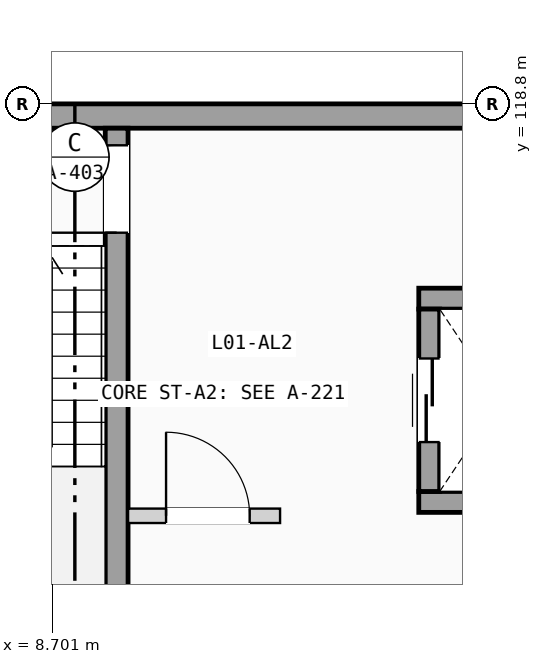
"""IFC4 building model, lengths in metres.
Left out: names, types, materials, properties, quantities, classifications, styles, units other than length and angle.
Written with IfcOpenShell. Run it as: python <this file> out.ifc"""

import sys

from ifc_helpers import new_model, si_unit, direction, frame, frame_2d, origin, place, context, subcontext, project, spatial, rectangle, extrude, element, fill, save


model = new_model("IFC4")
c1 = context("Model", 3, precision=1e-05, world=origin(), true_north=direction((0.0, 1.0)))
c2 = subcontext(c1, "Body", "Model", "MODEL_VIEW")
j1 = project(units=[si_unit("LENGTHUNIT", "METRE"), si_unit("PLANEANGLEUNIT", "RADIAN")], contexts=[c1])
p1 = place(None, origin())
s1 = spatial("IfcSite", under=j1, at=p1, CompositionType="ELEMENT")
p2 = place(p1, origin())
s2 = spatial("IfcBuilding", under=s1, at=p2, CompositionType="ELEMENT")
p3 = place(p2, frame((0.0, 0.0, 4.9)))
s3 = spatial("IfcBuildingStorey", under=s2, at=p3, CompositionType="ELEMENT", Elevation=4.9)
p4 = place(p3, frame((0.0, 118.64, 0.0), z_axis=(0.0, 0.0, 1.0), x_axis=(1.0, 0.0, 0.0)))
e1 = element("IfcWall", 1, at=p4, inside=s3, PredefinedType="SOLIDWALL", context=c2, shape_type="SweptSolid", body=[
    extrude(rectangle(XDim=21.6, YDim=0.32, at=frame_2d((10.8, 0.0))), origin(), (0.0, 0.0, 1.0), 3.415),
])
p5 = place(p3, frame((9.55, 111.48, 0.0), z_axis=(0.0, 0.0, 1.0), x_axis=(0.0, 1.0, 0.0)))
e2 = element("IfcWall", 2, at=p5, inside=s3, PredefinedType="SHEAR", context=c2, shape_type="SweptSolid", body=[
    extrude(rectangle(XDim=7.0, YDim=0.3, at=frame_2d((3.5, 0.0))), origin(), (0.0, 0.0, 1.0), 3.415),
])
p6 = place(p5, frame((5.625, 0.0, 0.0)))
e3 = element("IfcOpeningElement", 3, at=p6, cuts=e2, PredefinedType="OPENING", context=c2, shape_type="SweptSolid", body=[
    extrude(rectangle(XDim=1.15, YDim=2.12, at=frame_2d((0.575, 1.06))), frame((0.0, 0.16, 0.0), z_axis=(0.0, -1.0, 0.0), x_axis=(1.0, 0.0, 0.0)), (0.0, 0.0, 1.0), 0.32),
])
for number, where, z_axis, x_axis in (
    (4, (13.525, 113.562, 0.0), (0.0, 0.0, 1.0), (1.0, 0.0, 0.0)),
    (5, (13.525, 116.238, 0.0), (0.0, 0.0, 1.0), (1.0, 0.0, 0.0)),
):
    element("IfcWall", number, at=place(p3, frame(where, z_axis=z_axis, x_axis=x_axis)), inside=s3, PredefinedType="SHEAR", context=c2, shape_type="SweptSolid", body=[
        extrude(rectangle(XDim=2.15, YDim=0.275, at=frame_2d((1.075, 0.0))), origin(), (0.0, 0.0, 1.0), 3.415),
    ])
p7 = place(p3, frame((13.663, 113.7, 0.0), z_axis=(0.0, 0.0, 1.0), x_axis=(0.0, 1.0, 0.0)))
e6 = element("IfcWall", 6, at=p7, inside=s3, PredefinedType="SHEAR", context=c2, shape_type="SweptSolid", body=[
    extrude(rectangle(XDim=2.4, YDim=0.275, at=frame_2d((1.2, 0.0))), origin(), (0.0, 0.0, 1.0), 3.415),
])
p8 = place(p7, frame((0.65, 0.0, 0.0)))
e7 = element("IfcOpeningElement", 7, at=p8, cuts=e6, PredefinedType="OPENING", context=c2, shape_type="SweptSolid", body=[
    extrude(rectangle(XDim=1.1, YDim=2.15, at=frame_2d((0.55, 1.075))), frame((0.0, 0.147, 0.0), z_axis=(0.0, -1.0, 0.0), x_axis=(1.0, 0.0, 0.0)), (0.0, 0.0, 1.0), 0.295),
])
p9 = place(p3, frame((9.7, 113.38, 0.0), z_axis=(0.0, 0.0, 1.0), x_axis=(1.0, 0.0, 0.0)))
e8 = element("IfcWall", 8, at=p9, inside=s3, PredefinedType="PARTITIONING", context=c2, shape_type="SweptSolid", body=[
    extrude(rectangle(XDim=2.0, YDim=0.19, at=frame_2d((1.0, 0.0))), origin(), (0.0, 0.0, 1.0), 3.395),
])
p10 = place(p9, frame((0.5, 0.0, 0.0)))
e9 = element("IfcOpeningElement", 9, at=p10, cuts=e8, PredefinedType="OPENING", context=c2, shape_type="SweptSolid", body=[
    extrude(rectangle(XDim=1.1, YDim=2.12, at=frame_2d((0.55, 1.06))), frame((0.0, 0.105, 0.0), z_axis=(0.0, -1.0, 0.0), x_axis=(1.0, 0.0, 0.0)), (0.0, 0.0, 1.0), 0.21),
])
p11 = place(p6, origin())
e10 = element("IfcDoor", 10, at=p11, inside=s3, OperationType="SINGLE_SWING_LEFT", PredefinedType="DOOR", context=c2, shape_type="SweptSolid", body=[
    extrude(rectangle(XDim=1.15, YDim=2.12, at=frame_2d((0.575, 1.06))), frame((0.0, 0.025, 0.0), z_axis=(0.0, -1.0, 0.0), x_axis=(1.0, 0.0, 0.0)), (0.0, 0.0, 1.0), 0.05),
])
fill(e3, e10)
p12 = place(p8, origin())
e11 = element("IfcDoor", 11, at=p12, inside=s3, OperationType="SLIDING_TO_LEFT", PredefinedType="DOOR", context=c2, shape_type="SweptSolid", body=[
    extrude(rectangle(XDim=1.1, YDim=2.15, at=frame_2d((0.55, 1.075))), frame((0.0, 0.025, 0.0), z_axis=(0.0, -1.0, 0.0), x_axis=(1.0, 0.0, 0.0)), (0.0, 0.0, 1.0), 0.05),
])
fill(e7, e11)
p13 = place(p10, origin())
e12 = element("IfcDoor", 12, at=p13, inside=s3, OperationType="SINGLE_SWING_LEFT", PredefinedType="DOOR", context=c2, shape_type="SweptSolid", body=[
    extrude(rectangle(XDim=1.1, YDim=2.12, at=frame_2d((0.55, 1.06))), frame((0.0, 0.025, 0.0), z_axis=(0.0, -1.0, 0.0), x_axis=(1.0, 0.0, 0.0)), (0.0, 0.0, 1.0), 0.05),
])
fill(e9, e12)
save(model, sys.argv[1])
